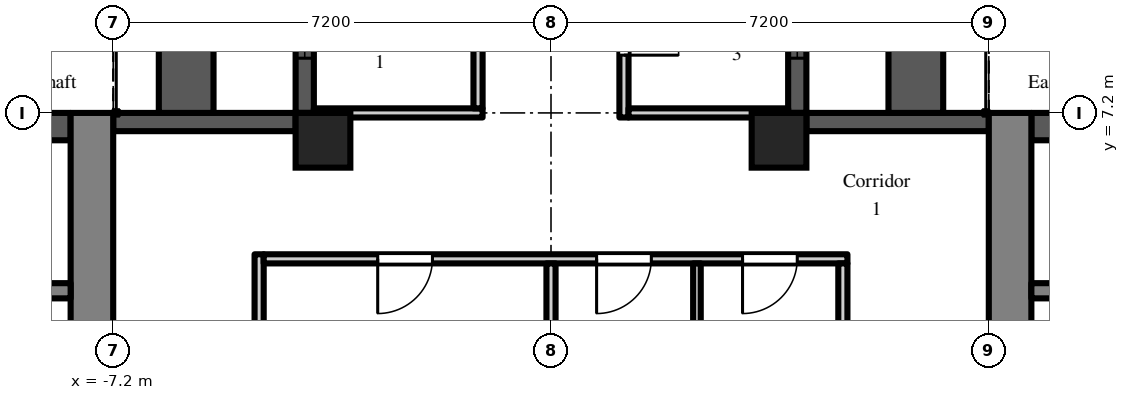
"""IFC4 building model, lengths in metres.
Left out: names, types, materials, properties, quantities, classifications, styles, units other than length and angle.
Written with IfcOpenShell. Run it as: python <this file> out.ifc"""

import sys

from ifc_helpers import new_model, si_unit, direction, frame, frame_2d, origin, origin_2d, place, context, subcontext, project, spatial, rectangle, extrude, element, fill, save


model = new_model("IFC4")
c1 = context("Model", 3, precision=1e-05, world=origin(), true_north=direction((0.0, 1.0)))
c2 = subcontext(c1, "Body", "Model", "MODEL_VIEW")
j1 = project(units=[si_unit("LENGTHUNIT", "METRE"), si_unit("PLANEANGLEUNIT", "RADIAN")], contexts=[c1])
p1 = place(None, origin())
s1 = spatial("IfcSite", under=j1, at=p1, CompositionType="ELEMENT")
p2 = place(p1, origin())
s2 = spatial("IfcBuilding", under=s1, at=p2, CompositionType="ELEMENT")
p3 = place(p2, frame((0.0, 0.0, 138.3)))
s3 = spatial("IfcBuildingStorey", under=s2, at=p3, CompositionType="ELEMENT", Elevation=138.3)
for number, where, z_axis, x_axis in (
    (1, (-3.75, 6.75, 0.0), (0.0, 0.0, 1.0), (1.0, 0.0, 0.0)),
    (2, (3.75, 6.75, 0.0), (0.0, 0.0, 1.0), (1.0, 0.0, 0.0)),
):
    element("IfcColumn", number, at=place(p3, frame(where, z_axis=z_axis, x_axis=x_axis)), inside=s3, PredefinedType="COLUMN", context=c2, shape_type="SweptSolid", body=[
        extrude(rectangle(XDim=0.9, YDim=0.9, at=origin_2d()), origin(), (0.0, 0.0, 1.0), 3.0),
    ])
p4 = place(p3, frame((7.2, 7.05, 0.0), z_axis=(0.0, 0.0, 1.0), x_axis=(-1.0, 0.0, 0.0)))
e3 = element("IfcWall", 3, at=p4, inside=s3, PredefinedType="SOLIDWALL", context=c2, shape_type="SweptSolid", body=[
    extrude(rectangle(XDim=3.0, YDim=0.3, at=frame_2d((1.5, 0.0))), origin(), (0.0, 0.0, 1.0), 2.2),
])
p5 = place(p3, frame((4.05, 7.2, 0.0), z_axis=(0.0, 0.0, 1.0), x_axis=(0.0, 1.0, 0.0)))
e4 = element("IfcWall", 4, at=p5, inside=s3, PredefinedType="SOLIDWALL", context=c2, shape_type="SweptSolid", body=[
    extrude(rectangle(XDim=7.2, YDim=0.3, at=frame_2d((3.6, 0.0))), origin(), (0.0, 0.0, 1.0), 2.2),
])
p6 = place(p5, frame((3.0, 0.0, 0.0)))
e5 = element("IfcOpeningElement", 5, at=p6, cuts=e4, PredefinedType="OPENING", context=c2, shape_type="SweptSolid", body=[
    extrude(rectangle(XDim=1.2, YDim=2.05, at=frame_2d((0.6, 1.025))), frame((0.0, 0.16, 0.0), z_axis=(0.0, -1.0, 0.0), x_axis=(1.0, 0.0, 0.0)), (0.0, 0.0, 1.0), 0.32),
])
p7 = place(p5, frame((0.9, 0.0, 0.2)))
e6 = element("IfcOpeningElement", 6, at=p7, cuts=e4, PredefinedType="OPENING", context=c2, shape_type="SweptSolid", body=[
    extrude(rectangle(XDim=1.8, YDim=1.85, at=frame_2d((0.9, 0.925))), frame((0.0, 0.16, 0.0), z_axis=(0.0, -1.0, 0.0), x_axis=(1.0, 0.0, 0.0)), (0.0, 0.0, 1.0), 0.32),
])
p8 = place(p5, frame((4.5, 0.0, 0.2)))
e7 = element("IfcOpeningElement", 7, at=p8, cuts=e4, PredefinedType="OPENING", context=c2, shape_type="SweptSolid", body=[
    extrude(rectangle(XDim=1.8, YDim=1.85, at=frame_2d((0.9, 0.925))), frame((0.0, 0.16, 0.0), z_axis=(0.0, -1.0, 0.0), x_axis=(1.0, 0.0, 0.0)), (0.0, 0.0, 1.0), 0.32),
])
p9 = place(p3, frame((-4.05, 14.4, 0.0), z_axis=(0.0, 0.0, 1.0), x_axis=(0.0, -1.0, 0.0)))
e8 = element("IfcWall", 8, at=p9, inside=s3, PredefinedType="SOLIDWALL", context=c2, shape_type="SweptSolid", body=[
    extrude(rectangle(XDim=7.2, YDim=0.3, at=frame_2d((3.6, 0.0))), origin(), (0.0, 0.0, 1.0), 2.2),
])
p10 = place(p9, frame((3.0, 0.0, 0.0)))
e9 = element("IfcOpeningElement", 9, at=p10, cuts=e8, PredefinedType="OPENING", context=c2, shape_type="SweptSolid", body=[
    extrude(rectangle(XDim=1.2, YDim=2.05, at=frame_2d((0.6, 1.025))), frame((0.0, 0.16, 0.0), z_axis=(0.0, -1.0, 0.0), x_axis=(1.0, 0.0, 0.0)), (0.0, 0.0, 1.0), 0.32),
])
p11 = place(p9, frame((0.9, 0.0, 0.2)))
e10 = element("IfcOpeningElement", 10, at=p11, cuts=e8, PredefinedType="OPENING", context=c2, shape_type="SweptSolid", body=[
    extrude(rectangle(XDim=1.8, YDim=1.85, at=frame_2d((0.9, 0.925))), frame((0.0, 0.16, 0.0), z_axis=(0.0, -1.0, 0.0), x_axis=(1.0, 0.0, 0.0)), (0.0, 0.0, 1.0), 0.32),
])
p12 = place(p9, frame((4.5, 0.0, 0.2)))
e11 = element("IfcOpeningElement", 11, at=p12, cuts=e8, PredefinedType="OPENING", context=c2, shape_type="SweptSolid", body=[
    extrude(rectangle(XDim=1.8, YDim=1.85, at=frame_2d((0.9, 0.925))), frame((0.0, 0.16, 0.0), z_axis=(0.0, -1.0, 0.0), x_axis=(1.0, 0.0, 0.0)), (0.0, 0.0, 1.0), 0.32),
])
p13 = place(p3, frame((-4.2, 7.05, 0.0), z_axis=(0.0, 0.0, 1.0), x_axis=(-1.0, 0.0, 0.0)))
e12 = element("IfcWall", 12, at=p13, inside=s3, PredefinedType="SOLIDWALL", context=c2, shape_type="SweptSolid", body=[
    extrude(rectangle(XDim=3.0, YDim=0.3, at=frame_2d((1.5, 0.0))), origin(), (0.0, 0.0, 1.0), 2.2),
])
for number, where, z_axis, x_axis in (
    (13, (6.0, 7.2, 0.0), (0.0, 0.0, 1.0), (0.0, 1.0, 0.0)),
    (14, (-6.0, 7.2, 0.0), (0.0, 0.0, 1.0), (0.0, 1.0, 0.0)),
):
    element("IfcWall", number, at=place(p3, frame(where, z_axis=z_axis, x_axis=x_axis)), inside=s3, PredefinedType="PARAPET", context=c2, shape_type="SweptSolid", body=[
        extrude(rectangle(XDim=7.2, YDim=0.9, at=frame_2d((3.6, 0.0))), origin(), (0.0, 0.0, 1.0), 0.8),
    ])
p14 = place(p3, frame((7.55, -7.2, 0.0), z_axis=(0.0, 0.0, 1.0), x_axis=(0.0, 1.0, 0.0)))
e15 = element("IfcWall", 15, at=p14, inside=s3, PredefinedType="SHEAR", context=c2, shape_type="SweptSolid", body=[
    extrude(rectangle(XDim=14.4, YDim=0.7, at=frame_2d((7.2, 0.0))), origin(), (0.0, 0.0, 1.0), 2.6),
])
p15 = place(p14, frame((6.0, 0.0, 0.0)))
e16 = element("IfcOpeningElement", 16, at=p15, cuts=e15, PredefinedType="OPENING", context=c2, shape_type="SweptSolid", body=[
    extrude(rectangle(XDim=2.4, YDim=2.2, at=frame_2d((1.2, 1.1))), frame((0.0, 0.36, 0.0), z_axis=(0.0, -1.0, 0.0), x_axis=(1.0, 0.0, 0.0)), (0.0, 0.0, 1.0), 0.72),
])
p16 = place(p3, frame((7.9, 6.975, 0.0), z_axis=(0.0, 0.0, 1.0), x_axis=(1.0, 0.0, 0.0)))
e17 = element("IfcWall", 17, at=p16, inside=s3, PredefinedType="SHEAR", context=c2, shape_type="SweptSolid", body=[
    extrude(rectangle(XDim=12.95, YDim=0.45, at=frame_2d((6.475, 0.0))), origin(), (0.0, 0.0, 1.0), 2.6),
])
p17 = place(p3, frame((7.9, 4.275, 0.0), z_axis=(0.0, 0.0, 1.0), x_axis=(1.0, 0.0, 0.0)))
e18 = element("IfcWall", 18, at=p17, inside=s3, PredefinedType="SHEAR", context=c2, shape_type="SweptSolid", body=[
    extrude(rectangle(XDim=1.95, YDim=0.25, at=frame_2d((0.975, 0.0))), origin(), (0.0, 0.0, 1.0), 2.6),
])
p18 = place(p3, frame((-7.55, -7.2, 0.0), z_axis=(0.0, 0.0, 1.0), x_axis=(0.0, 1.0, 0.0)))
e19 = element("IfcWall", 19, at=p18, inside=s3, PredefinedType="SHEAR", context=c2, shape_type="SweptSolid", body=[
    extrude(rectangle(XDim=14.4, YDim=0.7, at=frame_2d((7.2, 0.0))), origin(), (0.0, 0.0, 1.0), 2.6),
])
p19 = place(p18, frame((6.0, 0.0, 0.0)))
e20 = element("IfcOpeningElement", 20, at=p19, cuts=e19, PredefinedType="OPENING", context=c2, shape_type="SweptSolid", body=[
    extrude(rectangle(XDim=2.4, YDim=2.2, at=frame_2d((1.2, 1.1))), frame((0.0, 0.36, 0.0), z_axis=(0.0, -1.0, 0.0), x_axis=(1.0, 0.0, 0.0)), (0.0, 0.0, 1.0), 0.72),
])
p20 = place(p3, frame((-7.9, 6.975, 0.0), z_axis=(0.0, 0.0, 1.0), x_axis=(-1.0, 0.0, 0.0)))
e21 = element("IfcWall", 21, at=p20, inside=s3, PredefinedType="SHEAR", context=c2, shape_type="SweptSolid", body=[
    extrude(rectangle(XDim=12.95, YDim=0.45, at=frame_2d((6.475, 0.0))), origin(), (0.0, 0.0, 1.0), 2.6),
])
p21 = place(p3, frame((-7.9, 4.275, 0.0), z_axis=(0.0, 0.0, 1.0), x_axis=(-1.0, 0.0, 0.0)))
e22 = element("IfcWall", 22, at=p21, inside=s3, PredefinedType="SHEAR", context=c2, shape_type="SweptSolid", body=[
    extrude(rectangle(XDim=1.95, YDim=0.25, at=frame_2d((0.975, 0.0))), origin(), (0.0, 0.0, 1.0), 2.6),
])
p22 = place(p3, frame((-4.8, -4.875, 0.0), z_axis=(0.0, 0.0, 1.0), x_axis=(0.0, 1.0, 0.0)))
e23 = element("IfcWall", 23, at=p22, inside=s3, PredefinedType="PARTITIONING", context=c2, shape_type="SweptSolid", body=[
    extrude(rectangle(XDim=9.75, YDim=0.15, at=frame_2d((4.875, 0.0))), origin(), (0.0, 0.0, 1.0), 2.6),
])
p23 = place(p3, frame((-4.725, 4.8, 0.0), z_axis=(0.0, 0.0, 1.0), x_axis=(1.0, 0.0, 0.0)))
e24 = element("IfcWall", 24, at=p23, inside=s3, PredefinedType="PARTITIONING", context=c2, shape_type="SweptSolid", body=[
    extrude(rectangle(XDim=9.6, YDim=0.15, at=frame_2d((4.8, 0.0))), origin(), (0.0, 0.0, 1.0), 2.6),
])
p24 = place(p23, frame((7.875, 0.0, 0.0)))
e25 = element("IfcOpeningElement", 25, at=p24, cuts=e24, PredefinedType="OPENING", context=c2, shape_type="SweptSolid", body=[
    extrude(rectangle(XDim=0.9, YDim=2.1, at=frame_2d((0.45, 1.05))), frame((0.0, 0.085, 0.0), z_axis=(0.0, -1.0, 0.0), x_axis=(1.0, 0.0, 0.0)), (0.0, 0.0, 1.0), 0.17),
])
p25 = place(p23, frame((5.475, 0.0, 0.0)))
e26 = element("IfcOpeningElement", 26, at=p25, cuts=e24, PredefinedType="OPENING", context=c2, shape_type="SweptSolid", body=[
    extrude(rectangle(XDim=0.9, YDim=2.1, at=frame_2d((0.45, 1.05))), frame((0.0, 0.085, 0.0), z_axis=(0.0, -1.0, 0.0), x_axis=(1.0, 0.0, 0.0)), (0.0, 0.0, 1.0), 0.17),
])
p26 = place(p23, frame((1.875, 0.0, 0.0)))
e27 = element("IfcOpeningElement", 27, at=p26, cuts=e24, PredefinedType="OPENING", context=c2, shape_type="SweptSolid", body=[
    extrude(rectangle(XDim=0.9, YDim=2.1, at=frame_2d((0.45, 1.05))), frame((0.0, 0.085, 0.0), z_axis=(0.0, -1.0, 0.0), x_axis=(1.0, 0.0, 0.0)), (0.0, 0.0, 1.0), 0.17),
])
p27 = place(p3, frame((-3.9, 7.2, 0.0), z_axis=(0.0, 0.0, 1.0), x_axis=(1.0, 0.0, 0.0)))
e28 = element("IfcWall", 28, at=p27, inside=s3, PredefinedType="PARTITIONING", context=c2, shape_type="SweptSolid", body=[
    extrude(rectangle(XDim=2.775, YDim=0.15, at=frame_2d((1.387, 0.0))), origin(), (0.0, 0.0, 1.0), 2.6),
])
p28 = place(p3, frame((-1.2, 7.275, 0.0), z_axis=(0.0, 0.0, 1.0), x_axis=(0.0, 1.0, 0.0)))
e29 = element("IfcWall", 29, at=p28, inside=s3, PredefinedType="PARTITIONING", context=c2, shape_type="SweptSolid", body=[
    extrude(rectangle(XDim=14.025, YDim=0.15, at=frame_2d((7.013, 0.0))), origin(), (0.0, 0.0, 1.0), 2.6),
])
p29 = place(p28, frame((4.875, 0.0, 0.0)))
e30 = element("IfcOpeningElement", 30, at=p29, cuts=e29, PredefinedType="OPENING", context=c2, shape_type="SweptSolid", body=[
    extrude(rectangle(XDim=0.9, YDim=2.1, at=frame_2d((0.45, 1.05))), frame((0.0, 0.085, 0.0), z_axis=(0.0, -1.0, 0.0), x_axis=(1.0, 0.0, 0.0)), (0.0, 0.0, 1.0), 0.17),
])
p30 = place(p28, frame((9.675, 0.0, 0.0)))
e31 = element("IfcOpeningElement", 31, at=p30, cuts=e29, PredefinedType="OPENING", context=c2, shape_type="SweptSolid", body=[
    extrude(rectangle(XDim=1.8, YDim=2.1, at=frame_2d((0.9, 1.05))), frame((0.0, 0.085, 0.0), z_axis=(0.0, -1.0, 0.0), x_axis=(1.0, 0.0, 0.0)), (0.0, 0.0, 1.0), 0.17),
])
p31 = place(p3, frame((0.0, 2.475, 0.0), z_axis=(0.0, 0.0, 1.0), x_axis=(0.0, 1.0, 0.0)))
e32 = element("IfcWall", 32, at=p31, inside=s3, PredefinedType="PARTITIONING", context=c2, shape_type="SweptSolid", body=[
    extrude(rectangle(XDim=2.25, YDim=0.15, at=frame_2d((1.125, 0.0))), origin(), (0.0, 0.0, 1.0), 2.6),
])
p32 = place(p3, frame((1.2, 7.125, 0.0), z_axis=(0.0, 0.0, 1.0), x_axis=(0.0, 1.0, 0.0)))
e33 = element("IfcWall", 33, at=p32, inside=s3, PredefinedType="PARTITIONING", context=c2, shape_type="SweptSolid", body=[
    extrude(rectangle(XDim=14.175, YDim=0.15, at=frame_2d((7.087, 0.0))), origin(), (0.0, 0.0, 1.0), 2.6),
])
p33 = place(p32, frame((1.025, 0.0, 0.0)))
e34 = element("IfcOpeningElement", 34, at=p33, cuts=e33, PredefinedType="OPENING", context=c2, shape_type="SweptSolid", body=[
    extrude(rectangle(XDim=0.9, YDim=2.1, at=frame_2d((0.45, 1.05))), frame((0.0, 0.085, 0.0), z_axis=(0.0, -1.0, 0.0), x_axis=(1.0, 0.0, 0.0)), (0.0, 0.0, 1.0), 0.17),
])
p34 = place(p32, frame((4.625, 0.0, 0.0)))
e35 = element("IfcOpeningElement", 35, at=p34, cuts=e33, PredefinedType="OPENING", context=c2, shape_type="SweptSolid", body=[
    extrude(rectangle(XDim=0.9, YDim=2.1, at=frame_2d((0.45, 1.05))), frame((0.0, 0.085, 0.0), z_axis=(0.0, -1.0, 0.0), x_axis=(1.0, 0.0, 0.0)), (0.0, 0.0, 1.0), 0.17),
])
p35 = place(p32, frame((11.075, 0.0, 0.0)))
e36 = element("IfcOpeningElement", 36, at=p35, cuts=e33, PredefinedType="OPENING", context=c2, shape_type="SweptSolid", body=[
    extrude(rectangle(XDim=1.0, YDim=2.1, at=frame_2d((0.5, 1.05))), frame((0.0, 0.085, 0.0), z_axis=(0.0, -1.0, 0.0), x_axis=(1.0, 0.0, 0.0)), (0.0, 0.0, 1.0), 0.17),
])
p36 = place(p3, frame((1.275, 7.2, 0.0), z_axis=(0.0, 0.0, 1.0), x_axis=(1.0, 0.0, 0.0)))
e37 = element("IfcWall", 37, at=p36, inside=s3, PredefinedType="PARTITIONING", context=c2, shape_type="SweptSolid", body=[
    extrude(rectangle(XDim=2.625, YDim=0.15, at=frame_2d((1.312, 0.0))), origin(), (0.0, 0.0, 1.0), 2.6),
])
p37 = place(p3, frame((2.4, 2.462, 0.0), z_axis=(0.0, 0.0, 1.0), x_axis=(0.0, 1.0, 0.0)))
e38 = element("IfcWall", 38, at=p37, inside=s3, PredefinedType="PARTITIONING", context=c2, shape_type="SweptSolid", body=[
    extrude(rectangle(XDim=2.263, YDim=0.125, at=frame_2d((1.131, 0.0))), origin(), (0.0, 0.0, 1.0), 2.6),
])
p38 = place(p3, frame((4.8, -4.725, 0.0), z_axis=(0.0, 0.0, 1.0), x_axis=(0.0, 1.0, 0.0)))
e39 = element("IfcWall", 39, at=p38, inside=s3, PredefinedType="PARTITIONING", context=c2, shape_type="SweptSolid", body=[
    extrude(rectangle(XDim=9.45, YDim=0.15, at=frame_2d((4.725, 0.0))), origin(), (0.0, 0.0, 1.0), 2.6),
])
p39 = place(p7, origin())
e40 = element("IfcWindow", 40, at=p39, inside=s3, PartitioningType="SINGLE_PANEL", PredefinedType="WINDOW", context=c2, shape_type="SweptSolid", body=[
    extrude(rectangle(XDim=1.8, YDim=1.85, at=frame_2d((0.9, 0.925))), frame((0.0, 0.03, 0.0), z_axis=(0.0, -1.0, 0.0), x_axis=(1.0, 0.0, 0.0)), (0.0, 0.0, 1.0), 0.06),
])
fill(e6, e40)
p40 = place(p12, origin())
e41 = element("IfcWindow", 41, at=p40, inside=s3, PartitioningType="SINGLE_PANEL", PredefinedType="WINDOW", context=c2, shape_type="SweptSolid", body=[
    extrude(rectangle(XDim=1.8, YDim=1.85, at=frame_2d((0.9, 0.925))), frame((0.0, 0.03, 0.0), z_axis=(0.0, -1.0, 0.0), x_axis=(1.0, 0.0, 0.0)), (0.0, 0.0, 1.0), 0.06),
])
fill(e11, e41)
p41 = place(p24, frame((0.9, 0.0, 0.0), z_axis=(0.0, 0.0, 1.0), x_axis=(-1.0, 0.0, 0.0)))
e42 = element("IfcDoor", 42, at=p41, inside=s3, OperationType="SINGLE_SWING_RIGHT", PredefinedType="DOOR", context=c2, shape_type="SweptSolid", body=[
    extrude(rectangle(XDim=0.9, YDim=2.1, at=frame_2d((0.45, 1.05))), frame((0.0, 0.025, 0.0), z_axis=(0.0, -1.0, 0.0), x_axis=(1.0, 0.0, 0.0)), (0.0, 0.0, 1.0), 0.05),
])
fill(e25, e42)
p42 = place(p25, frame((0.9, 0.0, 0.0), z_axis=(0.0, 0.0, 1.0), x_axis=(-1.0, 0.0, 0.0)))
e43 = element("IfcDoor", 43, at=p42, inside=s3, OperationType="SINGLE_SWING_RIGHT", PredefinedType="DOOR", context=c2, shape_type="SweptSolid", body=[
    extrude(rectangle(XDim=0.9, YDim=2.1, at=frame_2d((0.45, 1.05))), frame((0.0, 0.025, 0.0), z_axis=(0.0, -1.0, 0.0), x_axis=(1.0, 0.0, 0.0)), (0.0, 0.0, 1.0), 0.05),
])
fill(e26, e43)
p43 = place(p26, frame((0.9, 0.0, 0.0), z_axis=(0.0, 0.0, 1.0), x_axis=(-1.0, 0.0, 0.0)))
e44 = element("IfcDoor", 44, at=p43, inside=s3, OperationType="SINGLE_SWING_RIGHT", PredefinedType="DOOR", context=c2, shape_type="SweptSolid", body=[
    extrude(rectangle(XDim=0.9, YDim=2.1, at=frame_2d((0.45, 1.05))), frame((0.0, 0.025, 0.0), z_axis=(0.0, -1.0, 0.0), x_axis=(1.0, 0.0, 0.0)), (0.0, 0.0, 1.0), 0.05),
])
fill(e27, e44)
p44 = place(p33, frame((0.9, 0.0, 0.0), z_axis=(0.0, 0.0, 1.0), x_axis=(-1.0, 0.0, 0.0)))
e45 = element("IfcDoor", 45, at=p44, inside=s3, OperationType="SINGLE_SWING_RIGHT", PredefinedType="DOOR", context=c2, shape_type="SweptSolid", body=[
    extrude(rectangle(XDim=0.9, YDim=2.1, at=frame_2d((0.45, 1.05))), frame((0.0, 0.025, 0.0), z_axis=(0.0, -1.0, 0.0), x_axis=(1.0, 0.0, 0.0)), (0.0, 0.0, 1.0), 0.05),
])
fill(e34, e45)
save(model, sys.argv[1])
